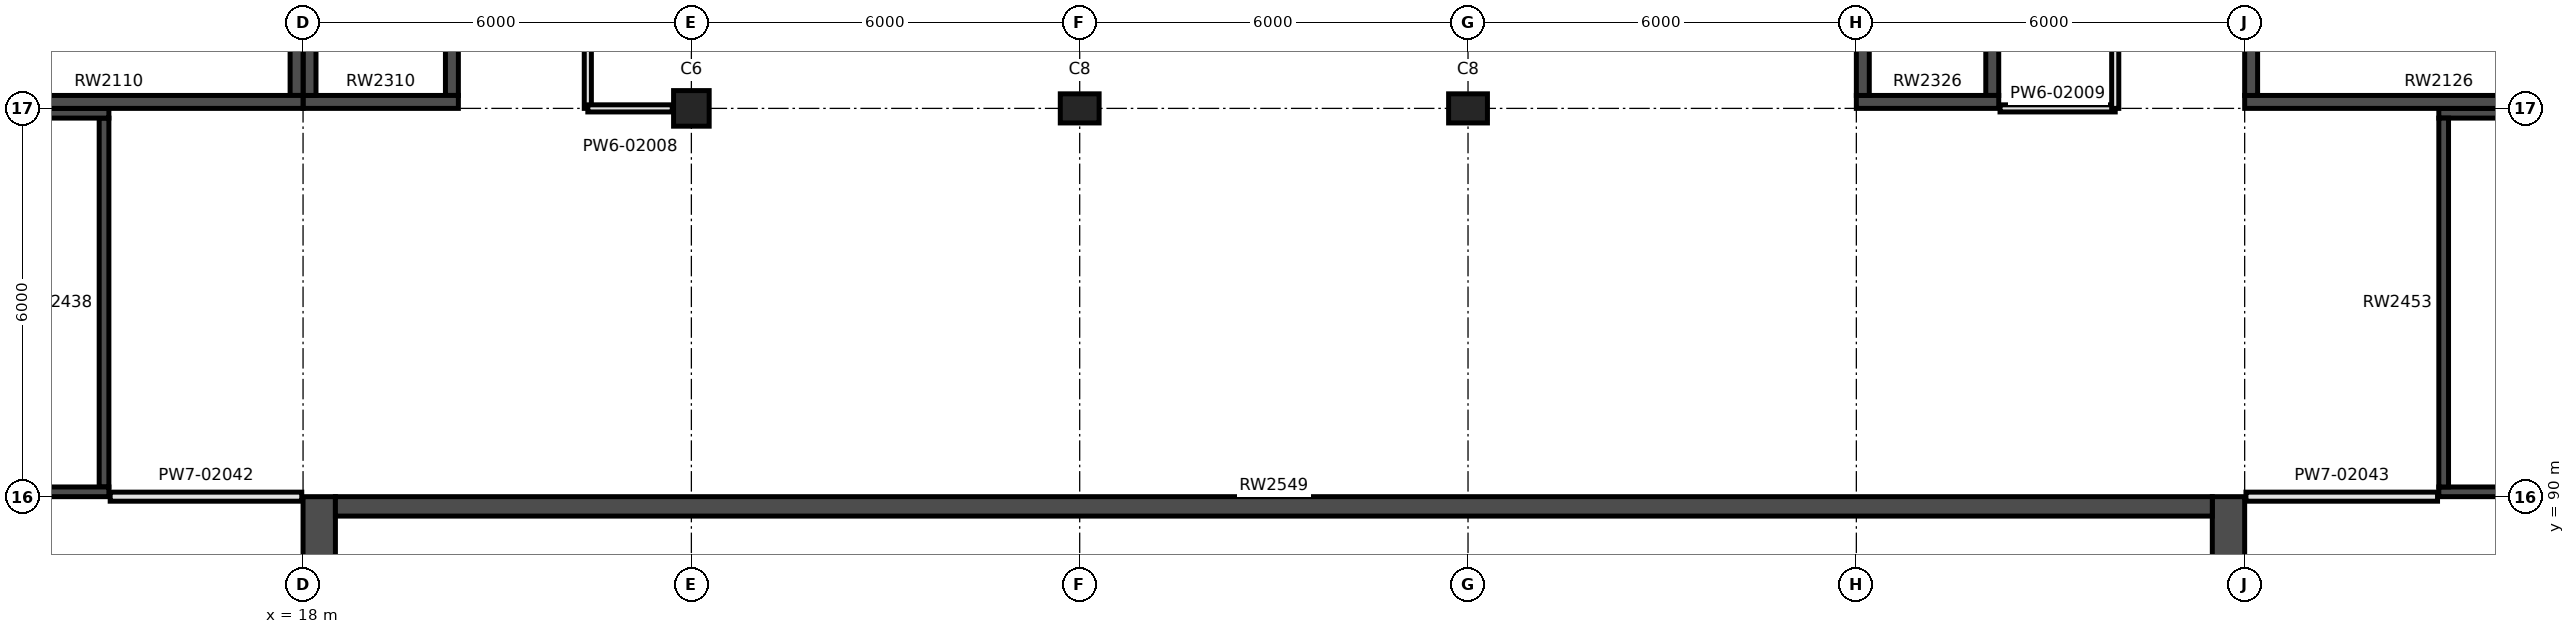
"""IFC4 building model, lengths in metres.
Left out: names, types, materials, properties, quantities, classifications, styles, units other than length and angle.
Written with IfcOpenShell. Run it as: python <this file> out.ifc"""

import sys

from ifc_helpers import new_model, si_unit, direction, frame, frame_2d, origin, origin_2d, place, context, subcontext, project, spatial, rectangle, extrude, element, fill, save


model = new_model("IFC4")
c1 = context("Model", 3, precision=1e-05, world=origin(), true_north=direction((0.0, 1.0)))
c2 = subcontext(c1, "Body", "Model", "MODEL_VIEW")
j1 = project(units=[si_unit("LENGTHUNIT", "METRE"), si_unit("PLANEANGLEUNIT", "RADIAN")], contexts=[c1])
p1 = place(None, origin())
s1 = spatial("IfcSite", under=j1, at=p1, CompositionType="ELEMENT")
p2 = place(p1, origin())
s2 = spatial("IfcBuilding", under=s1, at=p2, CompositionType="ELEMENT")
p3 = place(p2, frame((0.0, 0.0, 12.0)))
s3 = spatial("IfcBuildingStorey", under=s2, at=p3, CompositionType="ELEMENT", Elevation=12.0)
p4 = place(p3, frame((24.0, 96.0, 0.0), z_axis=(0.0, 0.0, 1.0), x_axis=(1.0, 0.0, 0.0)))
e1 = element("IfcColumn", 1, at=p4, inside=s3, PredefinedType="COLUMN", context=c2, shape_type="SweptSolid", body=[
    extrude(rectangle(XDim=0.55, YDim=0.55, at=origin_2d()), origin(), (0.0, 0.0, 1.0), 4.5),
])
for number, where, z_axis, x_axis in (
    (2, (30.0, 96.0, 0.0), (0.0, 0.0, 1.0), (1.0, 0.0, 0.0)),
    (3, (36.0, 96.0, 0.0), (0.0, 0.0, 1.0), (1.0, 0.0, 0.0)),
):
    element("IfcColumn", number, at=place(p3, frame(where, z_axis=z_axis, x_axis=x_axis)), inside=s3, PredefinedType="COLUMN", context=c2, shape_type="SweptSolid", body=[
        extrude(rectangle(XDim=0.6, YDim=0.45, at=origin_2d()), origin(), (0.0, 0.0, 1.0), 4.5),
    ])
p5 = place(p3, frame((12.0, 96.1, 0.0), z_axis=(0.0, 0.0, 1.0), x_axis=(1.0, 0.0, 0.0)))
e4 = element("IfcWall", 4, at=p5, inside=s3, PredefinedType="SHEAR", context=c2, shape_type="SweptSolid", body=[
    extrude(rectangle(XDim=6.0, YDim=0.2, at=frame_2d((3.0, 0.0))), origin(), (0.0, 0.0, 1.0), 4.5),
])
p6 = place(p3, frame((17.9, 96.2, 0.0), z_axis=(0.0, 0.0, 1.0), x_axis=(0.0, 1.0, 0.0)))
e5 = element("IfcWall", 5, at=p6, inside=s3, PredefinedType="SHEAR", context=c2, shape_type="SweptSolid", body=[
    extrude(rectangle(XDim=5.6, YDim=0.2, at=frame_2d((2.8, 0.0))), origin(), (0.0, 0.0, 1.0), 4.5),
])
p7 = place(p3, frame((48.0, 96.1, 0.0), z_axis=(0.0, 0.0, 1.0), x_axis=(1.0, 0.0, 0.0)))
e6 = element("IfcWall", 6, at=p7, inside=s3, PredefinedType="SHEAR", context=c2, shape_type="SweptSolid", body=[
    extrude(rectangle(XDim=6.0, YDim=0.2, at=frame_2d((3.0, 0.0))), origin(), (0.0, 0.0, 1.0), 4.5),
])
p8 = place(p3, frame((48.1, 96.2, 0.0), z_axis=(0.0, 0.0, 1.0), x_axis=(0.0, 1.0, 0.0)))
e7 = element("IfcWall", 7, at=p8, inside=s3, PredefinedType="SHEAR", context=c2, shape_type="SweptSolid", body=[
    extrude(rectangle(XDim=5.6, YDim=0.2, at=frame_2d((2.8, 0.0))), origin(), (0.0, 0.0, 1.0), 4.5),
])
p9 = place(p8, frame((4.4, 0.0, 0.0)))
e8 = element("IfcOpeningElement", 8, at=p9, cuts=e7, PredefinedType="OPENING", context=c2, shape_type="SweptSolid", body=[
    extrude(rectangle(XDim=1.1, YDim=2.2, at=frame_2d((0.55, 1.1))), frame((0.0, 0.11, 0.0), z_axis=(0.0, -1.0, 0.0), x_axis=(1.0, 0.0, 0.0)), (0.0, 0.0, 1.0), 0.22),
])
p10 = place(p3, frame((18.0, 96.1, 0.0), z_axis=(0.0, 0.0, 1.0), x_axis=(1.0, 0.0, 0.0)))
e9 = element("IfcWall", 9, at=p10, inside=s3, PredefinedType="SHEAR", context=c2, shape_type="SweptSolid", body=[
    extrude(rectangle(XDim=2.4, YDim=0.2, at=frame_2d((1.2, 0.0))), origin(), (0.0, 0.0, 1.0), 4.5),
])
for number, where, z_axis, x_axis in (
    (10, (18.1, 96.2, 0.0), (0.0, 0.0, 1.0), (0.0, 1.0, 0.0)),
    (11, (20.3, 96.2, 0.0), (0.0, 0.0, 1.0), (0.0, 1.0, 0.0)),
):
    element("IfcWall", number, at=place(p3, frame(where, z_axis=z_axis, x_axis=x_axis)), inside=s3, PredefinedType="SHEAR", context=c2, shape_type="SweptSolid", body=[
        extrude(rectangle(XDim=2.8, YDim=0.2, at=frame_2d((1.4, 0.0))), origin(), (0.0, 0.0, 1.0), 4.5),
    ])
p11 = place(p3, frame((42.0, 96.1, 0.0), z_axis=(0.0, 0.0, 1.0), x_axis=(1.0, 0.0, 0.0)))
e12 = element("IfcWall", 12, at=p11, inside=s3, PredefinedType="SHEAR", context=c2, shape_type="SweptSolid", body=[
    extrude(rectangle(XDim=2.2, YDim=0.2, at=frame_2d((1.1, 0.0))), origin(), (0.0, 0.0, 1.0), 4.5),
])
for number, where, z_axis, x_axis in (
    (13, (42.1, 96.2, 0.0), (0.0, 0.0, 1.0), (0.0, 1.0, 0.0)),
    (14, (44.1, 96.2, 0.0), (0.0, 0.0, 1.0), (0.0, 1.0, 0.0)),
):
    element("IfcWall", number, at=place(p3, frame(where, z_axis=z_axis, x_axis=x_axis)), inside=s3, PredefinedType="SHEAR", context=c2, shape_type="SweptSolid", body=[
        extrude(rectangle(XDim=2.0, YDim=0.2, at=frame_2d((1.0, 0.0))), origin(), (0.0, 0.0, 1.0), 4.5),
    ])
for number, where, z_axis, x_axis in (
    (15, (12.0, 95.925, 0.0), (0.0, 0.0, 1.0), (1.0, 0.0, 0.0)),
    (16, (12.0, 90.075, 0.0), (0.0, 0.0, 1.0), (1.0, 0.0, 0.0)),
):
    element("IfcWall", number, at=place(p3, frame(where, z_axis=z_axis, x_axis=x_axis)), inside=s3, PredefinedType="SHEAR", context=c2, shape_type="SweptSolid", body=[
        extrude(rectangle(XDim=3.0, YDim=0.15, at=frame_2d((1.5, 0.0))), origin(), (0.0, 0.0, 1.0), 4.5),
    ])
p12 = place(p3, frame((14.925, 90.15, 0.0), z_axis=(0.0, 0.0, 1.0), x_axis=(0.0, 1.0, 0.0)))
e17 = element("IfcWall", 17, at=p12, inside=s3, PredefinedType="SHEAR", context=c2, shape_type="SweptSolid", body=[
    extrude(rectangle(XDim=5.7, YDim=0.15, at=frame_2d((2.85, 0.0))), origin(), (0.0, 0.0, 1.0), 4.5),
])
for number, where, z_axis, x_axis in (
    (18, (51.0, 95.925, 0.0), (0.0, 0.0, 1.0), (1.0, 0.0, 0.0)),
    (19, (51.0, 90.075, 0.0), (0.0, 0.0, 1.0), (1.0, 0.0, 0.0)),
):
    element("IfcWall", number, at=place(p3, frame(where, z_axis=z_axis, x_axis=x_axis)), inside=s3, PredefinedType="SHEAR", context=c2, shape_type="SweptSolid", body=[
        extrude(rectangle(XDim=3.0, YDim=0.15, at=frame_2d((1.5, 0.0))), origin(), (0.0, 0.0, 1.0), 4.5),
    ])
p13 = place(p3, frame((51.075, 90.15, 0.0), z_axis=(0.0, 0.0, 1.0), x_axis=(0.0, 1.0, 0.0)))
e20 = element("IfcWall", 20, at=p13, inside=s3, PredefinedType="SHEAR", context=c2, shape_type="SweptSolid", body=[
    extrude(rectangle(XDim=5.7, YDim=0.15, at=frame_2d((2.85, 0.0))), origin(), (0.0, 0.0, 1.0), 4.5),
])
p14 = place(p3, frame((18.25, 54.5, 0.0), z_axis=(0.0, 0.0, 1.0), x_axis=(0.0, 1.0, 0.0)))
e21 = element("IfcWall", 21, at=p14, inside=s3, PredefinedType="SHEAR", context=c2, shape_type="SweptSolid", body=[
    extrude(rectangle(XDim=35.5, YDim=0.5, at=frame_2d((17.75, 0.0))), origin(), (0.0, 0.0, 1.0), 4.5),
])
p15 = place(p14, frame((25.35, 0.0, 0.0)))
e22 = element("IfcOpeningElement", 22, at=p15, cuts=e21, PredefinedType="OPENING", context=c2, shape_type="SweptSolid", body=[
    extrude(rectangle(XDim=1.3, YDim=2.1, at=frame_2d((0.65, 1.05))), frame((0.0, 0.26, 0.0), z_axis=(0.0, -1.0, 0.0), x_axis=(1.0, 0.0, 0.0)), (0.0, 0.0, 1.0), 0.52),
])
p16 = place(p3, frame((47.75, 54.5, 0.0), z_axis=(0.0, 0.0, 1.0), x_axis=(0.0, 1.0, 0.0)))
e23 = element("IfcWall", 23, at=p16, inside=s3, PredefinedType="SHEAR", context=c2, shape_type="SweptSolid", body=[
    extrude(rectangle(XDim=35.5, YDim=0.5, at=frame_2d((17.75, 0.0))), origin(), (0.0, 0.0, 1.0), 4.5),
])
p17 = place(p16, frame((25.35, 0.0, 0.0)))
e24 = element("IfcOpeningElement", 24, at=p17, cuts=e23, PredefinedType="OPENING", context=c2, shape_type="SweptSolid", body=[
    extrude(rectangle(XDim=1.3, YDim=2.1, at=frame_2d((0.65, 1.05))), frame((0.0, 0.26, 0.0), z_axis=(0.0, -1.0, 0.0), x_axis=(1.0, 0.0, 0.0)), (0.0, 0.0, 1.0), 0.52),
])
p18 = place(p3, frame((18.5, 89.85, 0.0), z_axis=(0.0, 0.0, 1.0), x_axis=(1.0, 0.0, 0.0)))
e25 = element("IfcWall", 25, at=p18, inside=s3, PredefinedType="SHEAR", context=c2, shape_type="SweptSolid", body=[
    extrude(rectangle(XDim=29.0, YDim=0.3, at=frame_2d((14.5, 0.0))), origin(), (0.0, 0.0, 1.0), 4.5),
])
p19 = place(p3, frame((22.4, 96.0, 0.0), z_axis=(0.0, 0.0, 1.0), x_axis=(0.0, 1.0, 0.0)))
e26 = element("IfcWall", 26, at=p19, inside=s3, PredefinedType="PARTITIONING", context=c2, shape_type="SweptSolid", body=[
    extrude(rectangle(XDim=3.2, YDim=0.11, at=frame_2d((1.6, 0.0))), origin(), (0.0, 0.0, 1.0), 3.65),
])
p20 = place(p19, frame((1.25, 0.0, 0.0)))
e27 = element("IfcOpeningElement", 27, at=p20, cuts=e26, PredefinedType="OPENING", context=c2, shape_type="SweptSolid", body=[
    extrude(rectangle(XDim=0.75, YDim=2.04, at=frame_2d((0.375, 1.02))), frame((0.0, 0.065, 0.0), z_axis=(0.0, -1.0, 0.0), x_axis=(1.0, 0.0, 0.0)), (0.0, 0.0, 1.0), 0.13),
])
p21 = place(p3, frame((22.4, 96.0, 0.0), z_axis=(0.0, 0.0, 1.0), x_axis=(1.0, 0.0, 0.0)))
e28 = element("IfcWall", 28, at=p21, inside=s3, PredefinedType="PARTITIONING", context=c2, shape_type="SweptSolid", body=[
    extrude(rectangle(XDim=1.305, YDim=0.11, at=frame_2d((0.653, 0.0))), origin(), (0.0, 0.0, 1.0), 3.65),
])
p22 = place(p3, frame((44.22, 96.0, 0.0), z_axis=(0.0, 0.0, 1.0), x_axis=(1.0, 0.0, 0.0)))
e29 = element("IfcWall", 29, at=p22, inside=s3, PredefinedType="PARTITIONING", context=c2, shape_type="SweptSolid", body=[
    extrude(rectangle(XDim=1.78, YDim=0.11, at=frame_2d((0.89, 0.0))), origin(), (0.0, 0.0, 1.0), 3.65),
])
p23 = place(p3, frame((46.0, 96.0, 0.0), z_axis=(0.0, 0.0, 1.0), x_axis=(0.0, 1.0, 0.0)))
e30 = element("IfcWall", 30, at=p23, inside=s3, PredefinedType="PARTITIONING", context=c2, shape_type="SweptSolid", body=[
    extrude(rectangle(XDim=2.4, YDim=0.11, at=frame_2d((1.2, 0.0))), origin(), (0.0, 0.0, 1.0), 3.65),
])
p24 = place(p23, frame((0.85, 0.0, 0.0)))
e31 = element("IfcOpeningElement", 31, at=p24, cuts=e30, PredefinedType="OPENING", context=c2, shape_type="SweptSolid", body=[
    extrude(rectangle(XDim=0.75, YDim=2.04, at=frame_2d((0.375, 1.02))), frame((0.0, 0.065, 0.0), z_axis=(0.0, -1.0, 0.0), x_axis=(1.0, 0.0, 0.0)), (0.0, 0.0, 1.0), 0.13),
])
p25 = place(p3, frame((15.02, 90.0, 0.0), z_axis=(0.0, 0.0, 1.0), x_axis=(1.0, 0.0, 0.0)))
e32 = element("IfcWall", 32, at=p25, inside=s3, PredefinedType="PARTITIONING", context=c2, shape_type="SweptSolid", body=[
    extrude(rectangle(XDim=2.96, YDim=0.14, at=frame_2d((1.48, 0.0))), origin(), (0.0, 0.0, 1.0), 3.65),
])
p26 = place(p25, frame((0.53, 0.0, 0.0)))
e33 = element("IfcOpeningElement", 33, at=p26, cuts=e32, PredefinedType="OPENING", context=c2, shape_type="SweptSolid", body=[
    extrude(rectangle(XDim=1.8, YDim=2.1, at=frame_2d((0.9, 1.05))), frame((0.0, 0.08, 0.0), z_axis=(0.0, -1.0, 0.0), x_axis=(1.0, 0.0, 0.0)), (0.0, 0.0, 1.0), 0.16),
])
p27 = place(p3, frame((48.02, 90.0, 0.0), z_axis=(0.0, 0.0, 1.0), x_axis=(1.0, 0.0, 0.0)))
e34 = element("IfcWall", 34, at=p27, inside=s3, PredefinedType="PARTITIONING", context=c2, shape_type="SweptSolid", body=[
    extrude(rectangle(XDim=2.96, YDim=0.14, at=frame_2d((1.48, 0.0))), origin(), (0.0, 0.0, 1.0), 3.65),
])
p28 = place(p27, frame((0.53, 0.0, 0.0)))
e35 = element("IfcOpeningElement", 35, at=p28, cuts=e34, PredefinedType="OPENING", context=c2, shape_type="SweptSolid", body=[
    extrude(rectangle(XDim=1.8, YDim=2.1, at=frame_2d((0.9, 1.05))), frame((0.0, 0.08, 0.0), z_axis=(0.0, -1.0, 0.0), x_axis=(1.0, 0.0, 0.0)), (0.0, 0.0, 1.0), 0.16),
])
p29 = place(p24, origin())
e36 = element("IfcDoor", 36, at=p29, inside=s3, OperationType="SINGLE_SWING_LEFT", PredefinedType="DOOR", context=c2, shape_type="SweptSolid", body=[
    extrude(rectangle(XDim=0.75, YDim=2.04, at=frame_2d((0.375, 1.02))), frame((0.0, 0.025, 0.0), z_axis=(0.0, -1.0, 0.0), x_axis=(1.0, 0.0, 0.0)), (0.0, 0.0, 1.0), 0.05),
])
fill(e31, e36)
p30 = place(p26, frame((1.8, 0.0, 0.0), z_axis=(0.0, 0.0, 1.0), x_axis=(-1.0, 0.0, 0.0)))
e37 = element("IfcDoor", 37, at=p30, inside=s3, OperationType="DOUBLE_DOOR_SINGLE_SWING", PredefinedType="DOOR", context=c2, shape_type="SweptSolid", body=[
    extrude(rectangle(XDim=1.8, YDim=2.1, at=frame_2d((0.9, 1.05))), frame((0.0, 0.025, 0.0), z_axis=(0.0, -1.0, 0.0), x_axis=(1.0, 0.0, 0.0)), (0.0, 0.0, 1.0), 0.05),
])
fill(e33, e37)
p31 = place(p28, frame((1.8, 0.0, 0.0), z_axis=(0.0, 0.0, 1.0), x_axis=(-1.0, 0.0, 0.0)))
e38 = element("IfcDoor", 38, at=p31, inside=s3, OperationType="DOUBLE_DOOR_SINGLE_SWING", PredefinedType="DOOR", context=c2, shape_type="SweptSolid", body=[
    extrude(rectangle(XDim=1.8, YDim=2.1, at=frame_2d((0.9, 1.05))), frame((0.0, 0.025, 0.0), z_axis=(0.0, -1.0, 0.0), x_axis=(1.0, 0.0, 0.0)), (0.0, 0.0, 1.0), 0.05),
])
fill(e35, e38)
save(model, sys.argv[1])
